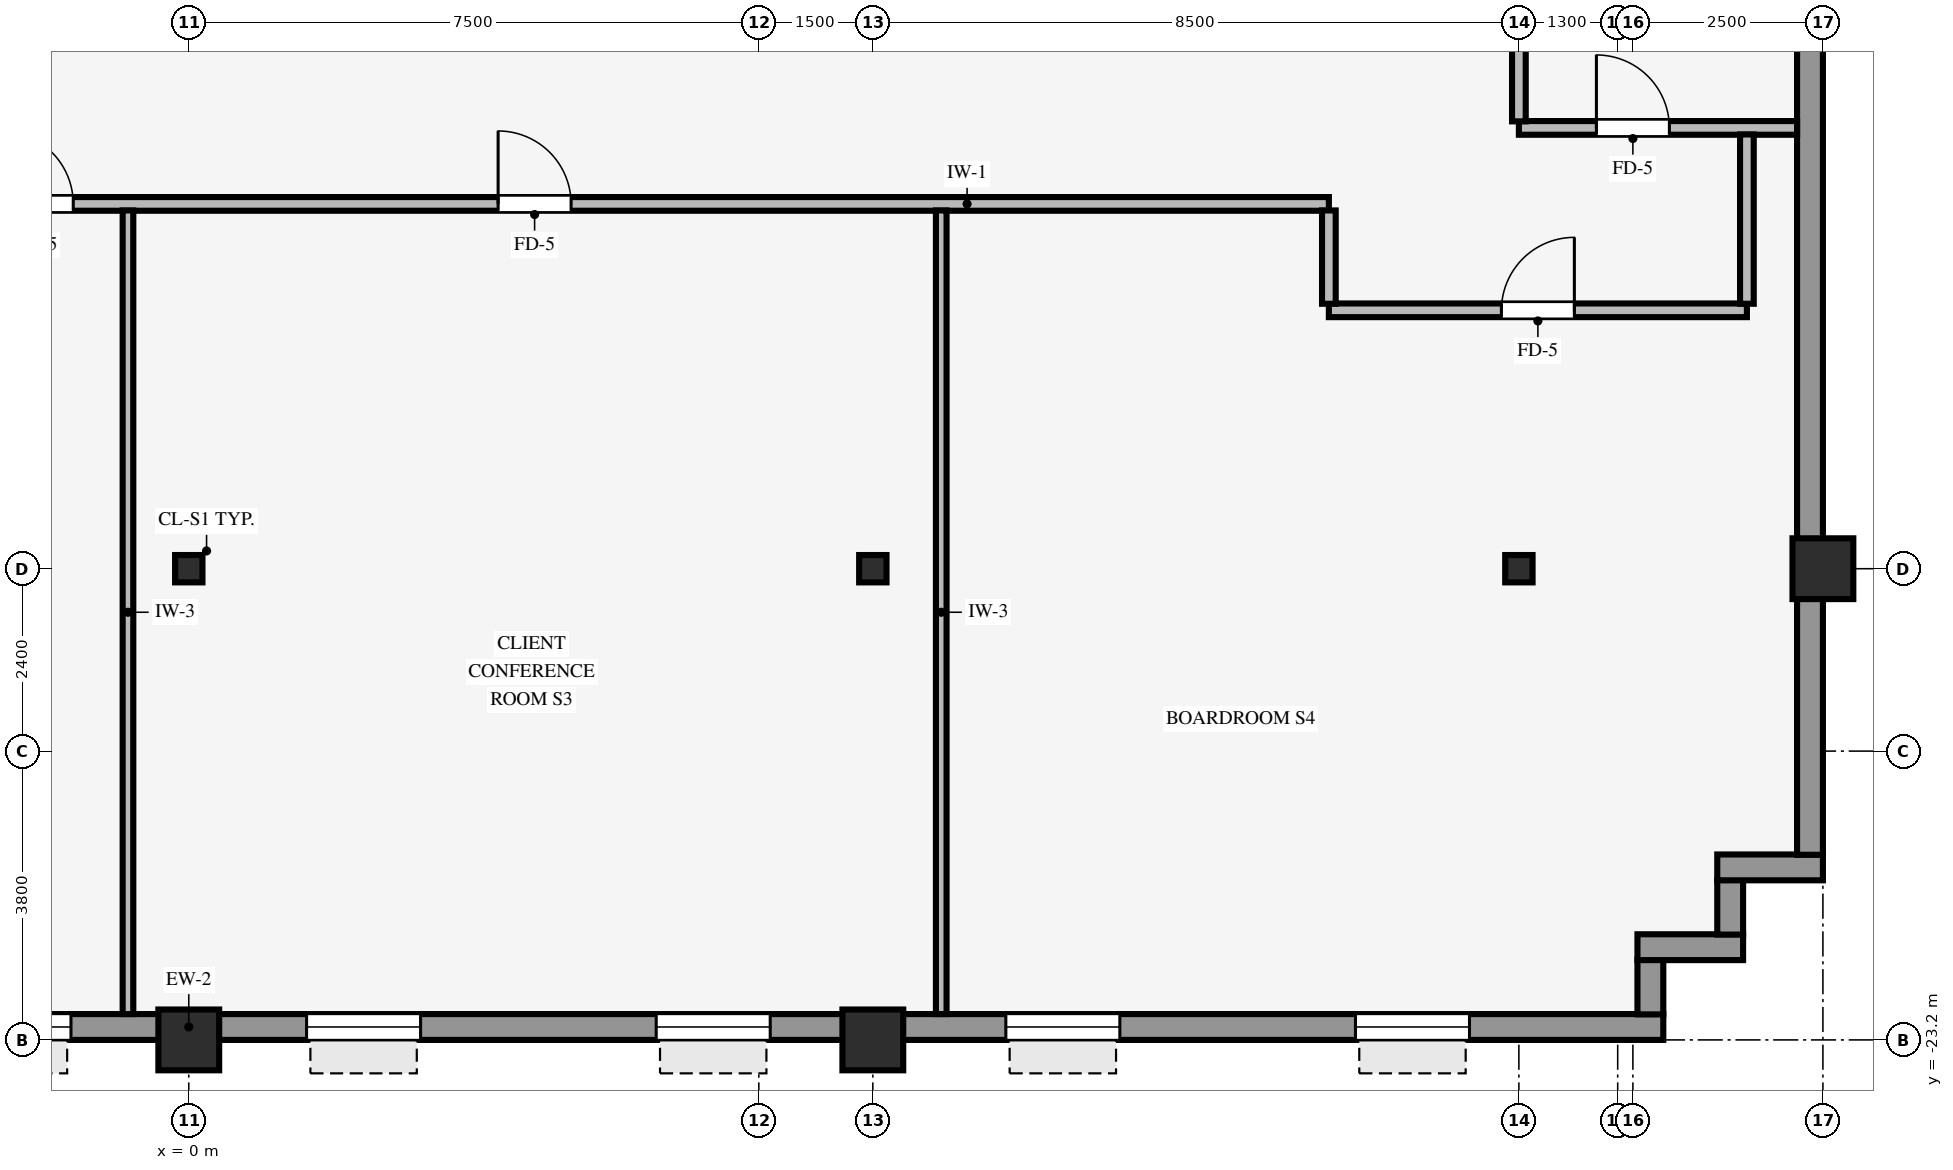
"""IFC4 building model, lengths in metres.
Left out: names, types, materials, properties, quantities, classifications, styles, units other than length and angle.
Written with IfcOpenShell. Run it as: python <this file> out.ifc"""

import sys

from ifc_helpers import new_model, si_unit, direction, frame, frame_2d, origin, origin_2d, place, context, subcontext, project, spatial, rectangle, hollow_rectangle, i_section, extrude, source, transform, mapped, element, fill, save


model = new_model("IFC4")
c1 = context("Model", 3, precision=1e-05, world=origin(), true_north=direction((0.0, 1.0)))
c2 = subcontext(c1, "Body", "Model", "MODEL_VIEW")
j1 = project(units=[si_unit("LENGTHUNIT", "METRE"), si_unit("PLANEANGLEUNIT", "RADIAN")], contexts=[c1])
p1 = place(None, origin())
s1 = spatial("IfcSite", under=j1, at=p1, CompositionType="ELEMENT")
p2 = place(p1, origin())
s2 = spatial("IfcBuilding", under=s1, at=p2, CompositionType="ELEMENT")
p3 = place(p2, frame((0.0, 0.0, 82.35)))
s3 = spatial("IfcBuildingStorey", under=s2, at=p3, CompositionType="ELEMENT", Elevation=82.35)
for number, where, z_axis, x_axis in (
    (1, (21.5, -17.0, 0.0), (0.0, 0.0, 1.0), (1.0, 0.0, 0.0)),
    (2, (0.0, -23.2, 0.0), (0.0, 0.0, 1.0), (1.0, 0.0, 0.0)),
    (3, (9.0, -23.2, 0.0), (0.0, 0.0, 1.0), (1.0, 0.0, 0.0)),
):
    element("IfcColumn", number, at=place(p3, frame(where, z_axis=z_axis, x_axis=x_axis)), inside=s3, PredefinedType="COLUMN", context=c2, shape_type="SweptSolid", body=[
        extrude(hollow_rectangle(XDim=0.8, YDim=0.8, WallThickness=0.055, InnerFilletRadius=0.055, OuterFilletRadius=0.11, at=origin_2d()), origin(), (0.0, 0.0, 1.0), 3.25),
    ])
for number, where, z_axis, x_axis in (
    (4, (0.0, -17.0, 0.0), (0.0, 0.0, 1.0), (1.0, 0.0, 0.0)),
    (5, (9.0, -17.0, 0.0), (0.0, 0.0, 1.0), (1.0, 0.0, 0.0)),
    (6, (17.5, -17.0, 0.0), (0.0, 0.0, 1.0), (1.0, 0.0, 0.0)),
):
    element("IfcColumn", number, at=place(p3, frame(where, z_axis=z_axis, x_axis=x_axis)), inside=s3, PredefinedType="COLUMN", context=c2, shape_type="SweptSolid", body=[
        extrude(i_section(OverallWidth=0.36, OverallDepth=0.36, WebThickness=0.021, FlangeThickness=0.021, FilletRadius=0.018, at=origin_2d()), origin(), (0.0, 0.0, 1.0), 3.25),
    ])
p4 = place(p3, frame((-19.4, -23.03, 0.0), z_axis=(0.0, 0.0, 1.0), x_axis=(1.0, 0.0, 0.0)))
e7 = element("IfcWall", 7, at=p4, inside=s3, PredefinedType="STANDARD", context=c2, shape_type="SweptSolid", body=[
    extrude(rectangle(XDim=38.8, YDim=0.34, at=frame_2d((19.4, 0.0))), origin(), (0.0, 0.0, 1.0), 2.585),
])
p5 = place(p4, frame((2.55, 0.0, 0.8)))
e8 = element("IfcOpeningElement", 8, at=p5, cuts=e7, PredefinedType="OPENING", context=c2, shape_type="SweptSolid", body=[
    extrude(rectangle(XDim=1.5, YDim=1.6, at=frame_2d((0.75, 0.8))), frame((0.0, 0.18, 0.0), z_axis=(0.0, -1.0, 0.0), x_axis=(1.0, 0.0, 0.0)), (0.0, 0.0, 1.0), 0.36),
])
p6 = place(p4, frame((7.15, 0.0, 0.8)))
e9 = element("IfcOpeningElement", 9, at=p6, cuts=e7, PredefinedType="OPENING", context=c2, shape_type="SweptSolid", body=[
    extrude(rectangle(XDim=1.5, YDim=1.6, at=frame_2d((0.75, 0.8))), frame((0.0, 0.18, 0.0), z_axis=(0.0, -1.0, 0.0), x_axis=(1.0, 0.0, 0.0)), (0.0, 0.0, 1.0), 0.36),
])
p7 = place(p4, frame((11.75, 0.0, 0.8)))
e10 = element("IfcOpeningElement", 10, at=p7, cuts=e7, PredefinedType="OPENING", context=c2, shape_type="SweptSolid", body=[
    extrude(rectangle(XDim=1.5, YDim=1.6, at=frame_2d((0.75, 0.8))), frame((0.0, 0.18, 0.0), z_axis=(0.0, -1.0, 0.0), x_axis=(1.0, 0.0, 0.0)), (0.0, 0.0, 1.0), 0.36),
])
p8 = place(p4, frame((16.35, 0.0, 0.8)))
e11 = element("IfcOpeningElement", 11, at=p8, cuts=e7, PredefinedType="OPENING", context=c2, shape_type="SweptSolid", body=[
    extrude(rectangle(XDim=1.5, YDim=1.6, at=frame_2d((0.75, 0.8))), frame((0.0, 0.18, 0.0), z_axis=(0.0, -1.0, 0.0), x_axis=(1.0, 0.0, 0.0)), (0.0, 0.0, 1.0), 0.36),
])
p9 = place(p4, frame((20.95, 0.0, 0.8)))
e12 = element("IfcOpeningElement", 12, at=p9, cuts=e7, PredefinedType="OPENING", context=c2, shape_type="SweptSolid", body=[
    extrude(rectangle(XDim=1.5, YDim=1.6, at=frame_2d((0.75, 0.8))), frame((0.0, 0.18, 0.0), z_axis=(0.0, -1.0, 0.0), x_axis=(1.0, 0.0, 0.0)), (0.0, 0.0, 1.0), 0.36),
])
p10 = place(p4, frame((25.55, 0.0, 0.8)))
e13 = element("IfcOpeningElement", 13, at=p10, cuts=e7, PredefinedType="OPENING", context=c2, shape_type="SweptSolid", body=[
    extrude(rectangle(XDim=1.5, YDim=1.6, at=frame_2d((0.75, 0.8))), frame((0.0, 0.18, 0.0), z_axis=(0.0, -1.0, 0.0), x_axis=(1.0, 0.0, 0.0)), (0.0, 0.0, 1.0), 0.36),
])
p11 = place(p4, frame((30.15, 0.0, 0.8)))
e14 = element("IfcOpeningElement", 14, at=p11, cuts=e7, PredefinedType="OPENING", context=c2, shape_type="SweptSolid", body=[
    extrude(rectangle(XDim=1.5, YDim=1.6, at=frame_2d((0.75, 0.8))), frame((0.0, 0.18, 0.0), z_axis=(0.0, -1.0, 0.0), x_axis=(1.0, 0.0, 0.0)), (0.0, 0.0, 1.0), 0.36),
])
p12 = place(p4, frame((34.75, 0.0, 0.8)))
e15 = element("IfcOpeningElement", 15, at=p12, cuts=e7, PredefinedType="OPENING", context=c2, shape_type="SweptSolid", body=[
    extrude(rectangle(XDim=1.5, YDim=1.6, at=frame_2d((0.75, 0.8))), frame((0.0, 0.18, 0.0), z_axis=(0.0, -1.0, 0.0), x_axis=(1.0, 0.0, 0.0)), (0.0, 0.0, 1.0), 0.36),
])
p13 = place(p3, frame((19.23, -22.864, 0.0), z_axis=(0.0, 0.0, 1.0), x_axis=(0.0, 1.0, 0.0)))
e16 = element("IfcWall", 16, at=p13, inside=s3, PredefinedType="STANDARD", context=c2, shape_type="SweptSolid", body=[
    extrude(rectangle(XDim=0.718, YDim=0.34, at=frame_2d((0.359, 0.0))), origin(), (0.0, 0.0, 1.0), 3.24),
])
p14 = place(p3, frame((19.06, -21.98, 0.0), z_axis=(0.0, 0.0, 1.0), x_axis=(1.0, 0.0, 0.0)))
e17 = element("IfcWall", 17, at=p14, inside=s3, PredefinedType="STANDARD", context=c2, shape_type="SweptSolid", body=[
    extrude(rectangle(XDim=1.39, YDim=0.34, at=frame_2d((0.695, 0.0))), origin(), (0.0, 0.0, 1.0), 3.24),
])
p15 = place(p3, frame((20.28, -21.814, 0.0), z_axis=(0.0, 0.0, 1.0), x_axis=(0.0, 1.0, 0.0)))
e18 = element("IfcWall", 18, at=p15, inside=s3, PredefinedType="STANDARD", context=c2, shape_type="SweptSolid", body=[
    extrude(rectangle(XDim=0.718, YDim=0.34, at=frame_2d((0.359, 0.0))), origin(), (0.0, 0.0, 1.0), 3.24),
])
p16 = place(p3, frame((20.11, -20.93, 0.0), z_axis=(0.0, 0.0, 1.0), x_axis=(1.0, 0.0, 0.0)))
e19 = element("IfcWall", 19, at=p16, inside=s3, PredefinedType="STANDARD", context=c2, shape_type="SweptSolid", body=[
    extrude(rectangle(XDim=1.39, YDim=0.34, at=frame_2d((0.695, 0.0))), origin(), (0.0, 0.0, 1.0), 3.24),
])
p17 = place(p3, frame((21.33, -20.764, 0.0), z_axis=(0.0, 0.0, 1.0), x_axis=(0.0, 1.0, 0.0)))
e20 = element("IfcWall", 20, at=p17, inside=s3, PredefinedType="STANDARD", context=c2, shape_type="SweptSolid", body=[
    extrude(rectangle(XDim=41.528, YDim=0.34, at=frame_2d((20.764, 0.0))), origin(), (0.0, 0.0, 1.0), 3.24),
])
p18 = place(p17, frame((15.793, 0.0, 0.8)))
e21 = element("IfcOpeningElement", 21, at=p18, cuts=e20, PredefinedType="OPENING", context=c2, shape_type="SweptSolid", body=[
    extrude(rectangle(XDim=2.3, YDim=1.62, at=frame_2d((1.15, 0.81))), frame((0.0, 0.18, 0.0), z_axis=(0.0, -1.0, 0.0), x_axis=(1.0, 0.0, 0.0)), (0.0, 0.0, 1.0), 0.36),
])
p19 = place(p17, frame((22.084, 0.0, 0.8)))
e22 = element("IfcOpeningElement", 22, at=p19, cuts=e20, PredefinedType="OPENING", context=c2, shape_type="SweptSolid", body=[
    extrude(rectangle(XDim=2.3, YDim=1.62, at=frame_2d((1.15, 0.81))), frame((0.0, 0.18, 0.0), z_axis=(0.0, -1.0, 0.0), x_axis=(1.0, 0.0, 0.0)), (0.0, 0.0, 1.0), 0.36),
])
p20 = place(p3, frame((15.0, -13.6, 0.0), z_axis=(0.0, 0.0, 1.0), x_axis=(1.0, 0.0, 0.0)))
e23 = element("IfcWall", 23, at=p20, inside=s3, PredefinedType="PARTITIONING", context=c2, shape_type="SweptSolid", body=[
    extrude(rectangle(XDim=5.5, YDim=0.18, at=frame_2d((2.75, 0.0))), origin(), (0.0, 0.0, 1.0), 2.878),
])
p21 = place(p20, frame((2.27, 0.0, 0.0)))
e24 = element("IfcOpeningElement", 24, at=p21, cuts=e23, PredefinedType="OPENING", context=c2, shape_type="SweptSolid", body=[
    extrude(rectangle(XDim=0.96, YDim=2.1, at=frame_2d((0.48, 1.05))), frame((0.0, 0.1, 0.0), z_axis=(0.0, -1.0, 0.0), x_axis=(1.0, 0.0, 0.0)), (0.0, 0.0, 1.0), 0.2),
])
p22 = place(p3, frame((-15.0, -12.2, 0.0), z_axis=(0.0, 0.0, 1.0), x_axis=(1.0, 0.0, 0.0)))
e25 = element("IfcWall", 25, at=p22, inside=s3, PredefinedType="PARTITIONING", context=c2, shape_type="SweptSolid", body=[
    extrude(rectangle(XDim=30.0, YDim=0.18, at=frame_2d((15.0, 0.0))), origin(), (0.0, 0.0, 1.0), 3.24),
])
p23 = place(p22, frame((19.07, 0.0, 0.0)))
e26 = element("IfcOpeningElement", 26, at=p23, cuts=e25, PredefinedType="OPENING", context=c2, shape_type="SweptSolid", body=[
    extrude(rectangle(XDim=0.96, YDim=2.1, at=frame_2d((0.48, 1.05))), frame((0.0, 0.1, 0.0), z_axis=(0.0, -1.0, 0.0), x_axis=(1.0, 0.0, 0.0)), (0.0, 0.0, 1.0), 0.2),
])
p24 = place(p22, frame((5.45, 0.0, 0.0)))
e27 = element("IfcOpeningElement", 27, at=p24, cuts=e25, PredefinedType="OPENING", context=c2, shape_type="SweptSolid", body=[
    extrude(rectangle(XDim=0.9, YDim=2.1, at=frame_2d((0.45, 1.05))), frame((0.0, 0.1, 0.0), z_axis=(0.0, -1.0, 0.0), x_axis=(1.0, 0.0, 0.0)), (0.0, 0.0, 1.0), 0.2),
])
p25 = place(p22, frame((2.85, 0.0, 0.0)))
e28 = element("IfcOpeningElement", 28, at=p25, cuts=e25, PredefinedType="OPENING", context=c2, shape_type="SweptSolid", body=[
    extrude(rectangle(XDim=0.9, YDim=2.1, at=frame_2d((0.45, 1.05))), frame((0.0, 0.1, 0.0), z_axis=(0.0, -1.0, 0.0), x_axis=(1.0, 0.0, 0.0)), (0.0, 0.0, 1.0), 0.2),
])
p26 = place(p22, frame((12.52, 0.0, 0.0)))
e29 = element("IfcOpeningElement", 29, at=p26, cuts=e25, PredefinedType="OPENING", context=c2, shape_type="SweptSolid", body=[
    extrude(rectangle(XDim=0.96, YDim=2.1, at=frame_2d((0.48, 1.05))), frame((0.0, 0.1, 0.0), z_axis=(0.0, -1.0, 0.0), x_axis=(1.0, 0.0, 0.0)), (0.0, 0.0, 1.0), 0.2),
])
p27 = place(p22, frame((7.95, 0.0, 0.0)))
e30 = element("IfcOpeningElement", 30, at=p27, cuts=e25, PredefinedType="OPENING", context=c2, shape_type="SweptSolid", body=[
    extrude(rectangle(XDim=0.9, YDim=2.1, at=frame_2d((0.45, 1.05))), frame((0.0, 0.1, 0.0), z_axis=(0.0, -1.0, 0.0), x_axis=(1.0, 0.0, 0.0)), (0.0, 0.0, 1.0), 0.2),
])
p28 = place(p3, frame((17.5, -11.2, 0.0), z_axis=(0.0, 0.0, 1.0), x_axis=(1.0, 0.0, 0.0)))
e31 = element("IfcWall", 31, at=p28, inside=s3, PredefinedType="PARTITIONING", context=c2, shape_type="SweptSolid", body=[
    extrude(rectangle(XDim=3.66, YDim=0.18, at=frame_2d((1.83, 0.0))), origin(), (0.0, 0.0, 1.0), 3.24),
])
p29 = place(p28, frame((1.02, 0.0, 0.0)))
e32 = element("IfcOpeningElement", 32, at=p29, cuts=e31, PredefinedType="OPENING", context=c2, shape_type="SweptSolid", body=[
    extrude(rectangle(XDim=0.96, YDim=2.1, at=frame_2d((0.48, 1.05))), frame((0.0, 0.1, 0.0), z_axis=(0.0, -1.0, 0.0), x_axis=(1.0, 0.0, 0.0)), (0.0, 0.0, 1.0), 0.2),
])
for number, where, z_axis, x_axis in (
    (33, (-0.8, -22.86, 0.0), (0.0, 0.0, 1.0), (0.0, 1.0, 0.0)),
    (34, (9.9, -22.86, 0.0), (0.0, 0.0, 1.0), (0.0, 1.0, 0.0)),
):
    element("IfcWall", number, at=place(p3, frame(where, z_axis=z_axis, x_axis=x_axis)), inside=s3, PredefinedType="PARTITIONING", context=c2, shape_type="SweptSolid", body=[
        extrude(rectangle(XDim=10.574, YDim=0.14, at=frame_2d((5.287, 0.0))), origin(), (0.0, 0.0, 1.0), 3.24),
    ])
p30 = place(p3, frame((15.0, -13.514, 0.0), z_axis=(0.0, 0.0, 1.0), x_axis=(0.0, 1.0, 0.0)))
e35 = element("IfcWall", 35, at=p30, inside=s3, PredefinedType="PARTITIONING", context=c2, shape_type="SweptSolid", body=[
    extrude(rectangle(XDim=1.228, YDim=0.18, at=frame_2d((0.614, 0.0))), origin(), (0.0, 0.0, 1.0), 3.24),
])
p31 = place(p3, frame((17.5, -11.114, 0.0), z_axis=(0.0, 0.0, 1.0), x_axis=(0.0, 1.0, 0.0)))
e36 = element("IfcWall", 36, at=p31, inside=s3, PredefinedType="PARTITIONING", context=c2, shape_type="SweptSolid", body=[
    extrude(rectangle(XDim=0.968, YDim=0.18, at=frame_2d((0.484, 0.0))), origin(), (0.0, 0.0, 1.0), 2.618),
])
p32 = place(p3, frame((20.5, -13.514, 0.0), z_axis=(0.0, 0.0, 1.0), x_axis=(0.0, 1.0, 0.0)))
e37 = element("IfcWall", 37, at=p32, inside=s3, PredefinedType="PARTITIONING", context=c2, shape_type="SweptSolid", body=[
    extrude(rectangle(XDim=2.228, YDim=0.18, at=frame_2d((1.114, 0.0))), origin(), (0.0, 0.0, 1.0), 3.24),
])
m1 = source(origin(), c2, "Body", "SweptSolid", [
    extrude(rectangle(XDim=1.5, YDim=1.6, at=frame_2d((0.75, 0.8))), frame((0.0, 0.03, 0.0), z_axis=(0.0, -1.0, 0.0), x_axis=(1.0, 0.0, 0.0)), (0.0, 0.0, 1.0), 0.06),
])
p33 = place(p8, origin())
e38 = element("IfcWindow", 38, at=p33, inside=s3, PartitioningType="SINGLE_PANEL", PredefinedType="WINDOW", context=c2, shape_type="MappedRepresentation", body=[
    mapped(m1, transform((0.0, 0.0, 0.0), scale=1.0)),
])
fill(e11, e38)
p34 = place(p9, origin())
e39 = element("IfcWindow", 39, at=p34, inside=s3, PartitioningType="SINGLE_PANEL", PredefinedType="WINDOW", context=c2, shape_type="MappedRepresentation", body=[
    mapped(m1, transform((0.0, 0.0, 0.0), scale=1.0)),
])
fill(e12, e39)
p35 = place(p10, origin())
e40 = element("IfcWindow", 40, at=p35, inside=s3, PartitioningType="SINGLE_PANEL", PredefinedType="WINDOW", context=c2, shape_type="MappedRepresentation", body=[
    mapped(m1, transform((0.0, 0.0, 0.0), scale=1.0)),
])
fill(e13, e40)
p36 = place(p11, origin())
e41 = element("IfcWindow", 41, at=p36, inside=s3, PartitioningType="SINGLE_PANEL", PredefinedType="WINDOW", context=c2, shape_type="MappedRepresentation", body=[
    mapped(m1, transform((0.0, 0.0, 0.0), scale=1.0)),
])
fill(e14, e41)
p37 = place(p12, origin())
e42 = element("IfcWindow", 42, at=p37, inside=s3, PartitioningType="SINGLE_PANEL", PredefinedType="WINDOW", context=c2, shape_type="MappedRepresentation", body=[
    mapped(m1, transform((0.0, 0.0, 0.0), scale=1.0)),
])
fill(e15, e42)
m2 = source(origin(), c2, "Body", "SweptSolid", [
    extrude(rectangle(XDim=0.96, YDim=2.1, at=frame_2d((0.48, 1.05))), frame((0.0, 0.025, 0.0), z_axis=(0.0, -1.0, 0.0), x_axis=(1.0, 0.0, 0.0)), (0.0, 0.0, 1.0), 0.05),
])
p38 = place(p23, origin())
e43 = element("IfcDoor", 43, at=p38, inside=s3, OperationType="SINGLE_SWING_LEFT", PredefinedType="DOOR", context=c2, shape_type="MappedRepresentation", body=[
    mapped(m2, transform((0.0, 0.0, 0.0), scale=1.0)),
])
fill(e26, e43)
p39 = place(p21, origin())
e44 = element("IfcDoor", 44, at=p39, inside=s3, OperationType="SINGLE_SWING_RIGHT", PredefinedType="DOOR", context=c2, shape_type="MappedRepresentation", body=[
    mapped(m2, transform((0.0, 0.0, 0.0), scale=1.0)),
])
fill(e24, e44)
p40 = place(p29, origin())
e45 = element("IfcDoor", 45, at=p40, inside=s3, OperationType="SINGLE_SWING_LEFT", PredefinedType="DOOR", context=c2, shape_type="MappedRepresentation", body=[
    mapped(m2, transform((0.0, 0.0, 0.0), scale=1.0)),
])
fill(e32, e45)
p41 = place(p26, origin())
e46 = element("IfcDoor", 46, at=p41, inside=s3, OperationType="SINGLE_SWING_LEFT", PredefinedType="DOOR", context=c2, shape_type="MappedRepresentation", body=[
    mapped(m2, transform((0.0, 0.0, 0.0), scale=1.0)),
])
fill(e29, e46)
save(model, sys.argv[1])
